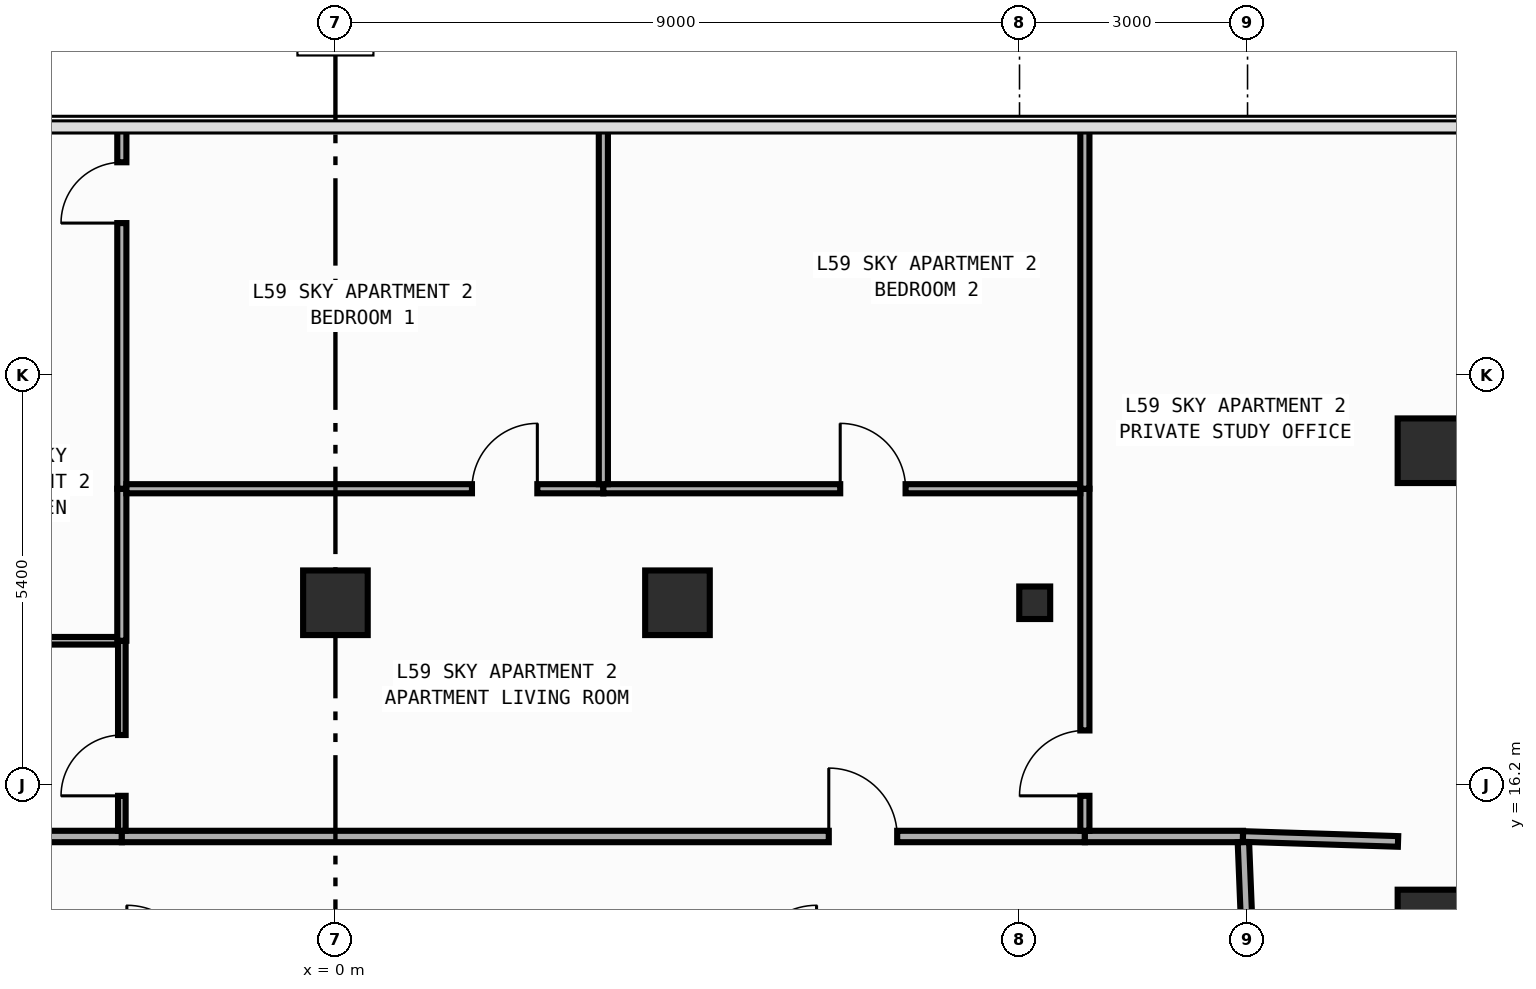
"""IFC4 building model, lengths in metres.
Left out: names, types, materials, properties, quantities, classifications, styles, units other than length and angle.
Written with IfcOpenShell. Run it as: python <this file> out.ifc"""

import sys

from ifc_helpers import new_model, si_unit, direction, frame, frame_2d, origin, origin_2d, place, context, subcontext, project, spatial, rectangle, i_section, extrude, element, fill, save


model = new_model("IFC4")
c1 = context("Model", 3, precision=1e-05, world=origin(), true_north=direction((0.0, 1.0)))
c2 = subcontext(c1, "Body", "Model", "MODEL_VIEW")
j1 = project(units=[si_unit("LENGTHUNIT", "METRE"), si_unit("PLANEANGLEUNIT", "RADIAN")], contexts=[c1])
p1 = place(None, origin())
s1 = spatial("IfcSite", under=j1, at=p1, CompositionType="ELEMENT")
p2 = place(p1, origin())
s2 = spatial("IfcBuilding", under=s1, at=p2, CompositionType="ELEMENT")
p3 = place(p2, frame((0.0, 0.0, 251.2)))
s3 = spatial("IfcBuildingStorey", under=s2, at=p3, CompositionType="ELEMENT", Elevation=251.2)
p4 = place(p3, frame((9.2, 18.6, 0.0), z_axis=(0.0, 0.0, 1.0), x_axis=(1.0, 0.0, 0.0)))
e1 = element("IfcColumn", 1, at=p4, inside=s3, PredefinedType="COLUMN", context=c2, shape_type="SweptSolid", body=[
    extrude(i_section(OverallWidth=0.407, OverallDepth=0.428, WebThickness=0.02, FlangeThickness=0.035, FilletRadius=0.022, at=origin_2d()), origin(), (0.0, 0.0, 1.0), 3.6),
])
for number, where, z_axis, x_axis in (
    (2, (14.4, 14.4, 0.0), (0.0, 0.0, 1.0), (1.0, 0.0, 0.0)),
    (3, (0.0, 18.6, 0.0), (0.0, 0.0, 1.0), (1.0, 0.0, 0.0)),
    (4, (4.5, 18.6, 0.0), (0.0, 0.0, 1.0), (1.0, 0.0, 0.0)),
    (5, (14.4, 20.6, 0.0), (0.0, 0.0, 1.0), (1.0, 0.0, 0.0)),
):
    element("IfcColumn", number, at=place(p3, frame(where, z_axis=z_axis, x_axis=x_axis)), inside=s3, PredefinedType="COLUMN", context=c2, shape_type="SweptSolid", body=[
        extrude(rectangle(XDim=0.85, YDim=0.85, at=origin_2d()), origin(), (0.0, 0.0, 1.0), 3.6),
    ])
p5 = place(p3, frame((-5.4, 15.525, 0.0), z_axis=(0.0, 0.0, 1.0), x_axis=(1.0, 0.0, 0.0)))
e6 = element("IfcWall", 6, at=p5, inside=s3, PredefinedType="PARTITIONING", context=c2, shape_type="SweptSolid", body=[
    extrude(rectangle(XDim=2.59, YDim=0.15, at=frame_2d((1.295, 0.0))), origin(), (0.0, 0.0, 1.0), 3.34),
])
p6 = place(p3, frame((-2.81, 15.525, 0.0), z_axis=(0.0, 0.0, 1.0), x_axis=(1.0, 0.0, 0.0)))
e7 = element("IfcWall", 7, at=p6, inside=s3, PredefinedType="PARTITIONING", context=c2, shape_type="SweptSolid", body=[
    extrude(rectangle(XDim=12.67, YDim=0.15, at=frame_2d((6.335, 0.0))), origin(), (0.0, 0.0, 1.0), 3.34),
])
p7 = place(p6, frame((9.301, 0.0, 0.0)))
e8 = element("IfcOpeningElement", 8, at=p7, cuts=e7, PredefinedType="OPENING", context=c2, shape_type="SweptSolid", body=[
    extrude(rectangle(XDim=0.9, YDim=2.15, at=frame_2d((0.45, 1.075))), frame((0.0, 0.085, 0.0), z_axis=(0.0, -1.0, 0.0), x_axis=(1.0, 0.0, 0.0)), (0.0, 0.0, 1.0), 0.17),
])
p8 = place(p3, frame((9.86, 15.525, 0.0), z_axis=(0.0, 0.0, 1.0), x_axis=(1.0, 0.0, 0.0)))
e9 = element("IfcWall", 9, at=p8, inside=s3, PredefinedType="PARTITIONING", context=c2, shape_type="SweptSolid", body=[
    extrude(rectangle(XDim=2.08, YDim=0.15, at=frame_2d((1.04, 0.0))), origin(), (0.0, 0.0, 1.0), 3.34),
])
p9 = place(p3, frame((12.015, 13.72, 0.0), z_axis=(0.0, 0.0, 1.0), x_axis=(-0.040046877756, 0.99919780203, 0.0)))
e10 = element("IfcWall", 10, at=p9, inside=s3, PredefinedType="PARTITIONING", context=c2, shape_type="SweptSolid", body=[
    extrude(rectangle(XDim=1.731, YDim=0.15, at=frame_2d((0.866, 0.0))), origin(), (0.0, 0.0, 1.0), 3.34),
])
p10 = place(p3, frame((-5.33, 18.1, 0.0), z_axis=(0.0, 0.0, 1.0), x_axis=(1.0, 0.0, 0.0)))
e11 = element("IfcWall", 11, at=p10, inside=s3, PredefinedType="PARTITIONING", context=c2, shape_type="SweptSolid", body=[
    extrude(rectangle(XDim=2.47, YDim=0.1, at=frame_2d((1.235, 0.0))), origin(), (0.0, 0.0, 1.0), 3.34),
])
p11 = place(p3, frame((-2.81, 15.6, 0.0), z_axis=(0.0, 0.0, 1.0), x_axis=(0.0, 1.0, 0.0)))
e12 = element("IfcWall", 12, at=p11, inside=s3, PredefinedType="PARTITIONING", context=c2, shape_type="SweptSolid", body=[
    extrude(rectangle(XDim=2.5, YDim=0.1, at=frame_2d((1.25, 0.0))), origin(), (0.0, 0.0, 1.0), 3.34),
])
p12 = place(p11, frame((0.46, 0.0, 0.0)))
e13 = element("IfcOpeningElement", 13, at=p12, cuts=e12, PredefinedType="OPENING", context=c2, shape_type="SweptSolid", body=[
    extrude(rectangle(XDim=0.8, YDim=2.1, at=frame_2d((0.4, 1.05))), frame((0.0, 0.06, 0.0), z_axis=(0.0, -1.0, 0.0), x_axis=(1.0, 0.0, 0.0)), (0.0, 0.0, 1.0), 0.12),
])
p13 = place(p3, frame((-2.81, 18.1, 0.0), z_axis=(0.0, 0.0, 1.0), x_axis=(0.0, 1.0, 0.0)))
e14 = element("IfcWall", 14, at=p13, inside=s3, PredefinedType="PARTITIONING", context=c2, shape_type="SweptSolid", body=[
    extrude(rectangle(XDim=2.0, YDim=0.12, at=frame_2d((1.0, 0.0))), origin(), (0.0, 0.0, 1.0), 3.34),
])
p14 = place(p3, frame((-2.81, 20.1, 0.0), z_axis=(0.0, 0.0, 1.0), x_axis=(0.0, 1.0, 0.0)))
e15 = element("IfcWall", 15, at=p14, inside=s3, PredefinedType="PARTITIONING", context=c2, shape_type="SweptSolid", body=[
    extrude(rectangle(XDim=4.755, YDim=0.12, at=frame_2d((2.377, 0.0))), origin(), (0.0, 0.0, 1.0), 3.34),
])
p15 = place(p14, frame((3.495, 0.0, 0.0)))
e16 = element("IfcOpeningElement", 16, at=p15, cuts=e15, PredefinedType="OPENING", context=c2, shape_type="SweptSolid", body=[
    extrude(rectangle(XDim=0.8, YDim=2.1, at=frame_2d((0.4, 1.05))), frame((0.0, 0.07, 0.0), z_axis=(0.0, -1.0, 0.0), x_axis=(1.0, 0.0, 0.0)), (0.0, 0.0, 1.0), 0.14),
])
p16 = place(p3, frame((9.86, 15.6, 0.0), z_axis=(0.0, 0.0, 1.0), x_axis=(0.0, 1.0, 0.0)))
e17 = element("IfcWall", 17, at=p16, inside=s3, PredefinedType="PARTITIONING", context=c2, shape_type="SweptSolid", body=[
    extrude(rectangle(XDim=4.5, YDim=0.12, at=frame_2d((2.25, 0.0))), origin(), (0.0, 0.0, 1.0), 3.34),
])
p17 = place(p16, frame((0.46, 0.0, 0.0)))
e18 = element("IfcOpeningElement", 18, at=p17, cuts=e17, PredefinedType="OPENING", context=c2, shape_type="SweptSolid", body=[
    extrude(rectangle(XDim=0.86, YDim=2.15, at=frame_2d((0.43, 1.075))), frame((0.0, 0.07, 0.0), z_axis=(0.0, -1.0, 0.0), x_axis=(1.0, 0.0, 0.0)), (0.0, 0.0, 1.0), 0.14),
])
p18 = place(p3, frame((-2.75, 20.1, 0.0), z_axis=(0.0, 0.0, 1.0), x_axis=(1.0, 0.0, 0.0)))
e19 = element("IfcWall", 19, at=p18, inside=s3, PredefinedType="PARTITIONING", context=c2, shape_type="SweptSolid", body=[
    extrude(rectangle(XDim=6.275, YDim=0.12, at=frame_2d((3.137, 0.0))), origin(), (0.0, 0.0, 1.0), 3.34),
])
p19 = place(p18, frame((4.546, 0.0, 0.0)))
e20 = element("IfcOpeningElement", 20, at=p19, cuts=e19, PredefinedType="OPENING", context=c2, shape_type="SweptSolid", body=[
    extrude(rectangle(XDim=0.86, YDim=2.15, at=frame_2d((0.43, 1.075))), frame((0.0, 0.07, 0.0), z_axis=(0.0, -1.0, 0.0), x_axis=(1.0, 0.0, 0.0)), (0.0, 0.0, 1.0), 0.14),
])
p20 = place(p3, frame((3.525, 20.1, 0.0), z_axis=(0.0, 0.0, 1.0), x_axis=(1.0, 0.0, 0.0)))
e21 = element("IfcWall", 21, at=p20, inside=s3, PredefinedType="PARTITIONING", context=c2, shape_type="SweptSolid", body=[
    extrude(rectangle(XDim=6.275, YDim=0.12, at=frame_2d((3.138, 0.0))), origin(), (0.0, 0.0, 1.0), 3.34),
])
p21 = place(p20, frame((3.116, 0.0, 0.0)))
e22 = element("IfcOpeningElement", 22, at=p21, cuts=e21, PredefinedType="OPENING", context=c2, shape_type="SweptSolid", body=[
    extrude(rectangle(XDim=0.86, YDim=2.15, at=frame_2d((0.43, 1.075))), frame((0.0, 0.07, 0.0), z_axis=(0.0, -1.0, 0.0), x_axis=(1.0, 0.0, 0.0)), (0.0, 0.0, 1.0), 0.14),
])
p22 = place(p3, frame((9.86, 20.1, 0.0), z_axis=(0.0, 0.0, 1.0), x_axis=(0.0, 1.0, 0.0)))
e23 = element("IfcWall", 23, at=p22, inside=s3, PredefinedType="PARTITIONING", context=c2, shape_type="SweptSolid", body=[
    extrude(rectangle(XDim=4.755, YDim=0.12, at=frame_2d((2.377, 0.0))), origin(), (0.0, 0.0, 1.0), 3.34),
])
p23 = place(p3, frame((11.94, 15.525, 0.0), z_axis=(0.0, 0.0, 1.0), x_axis=(0.999493701671, -0.031817295912, 0.0)))
e24 = element("IfcWall", 24, at=p23, inside=s3, PredefinedType="PARTITIONING", context=c2, shape_type="SweptSolid", body=[
    extrude(rectangle(XDim=2.041, YDim=0.14, at=frame_2d((1.021, 0.0))), origin(), (0.0, 0.0, 1.0), 3.34),
])
p24 = place(p3, frame((3.525, 20.16, 0.0), z_axis=(0.0, 0.0, 1.0), x_axis=(0.0, 1.0, 0.0)))
e25 = element("IfcWall", 25, at=p24, inside=s3, PredefinedType="PARTITIONING", context=c2, shape_type="SweptSolid", body=[
    extrude(rectangle(XDim=4.695, YDim=0.12, at=frame_2d((2.348, 0.0))), origin(), (0.0, 0.0, 1.0), 3.34),
])
p25 = place(p7, origin())
e26 = element("IfcDoor", 26, at=p25, inside=s3, OperationType="SINGLE_SWING_LEFT", PredefinedType="DOOR", context=c2, shape_type="SweptSolid", body=[
    extrude(rectangle(XDim=0.9, YDim=2.15, at=frame_2d((0.45, 1.075))), frame((0.0, 0.025, 0.0), z_axis=(0.0, -1.0, 0.0), x_axis=(1.0, 0.0, 0.0)), (0.0, 0.0, 1.0), 0.05),
])
fill(e8, e26)
p26 = place(p12, origin())
e27 = element("IfcDoor", 27, at=p26, inside=s3, OperationType="SINGLE_SWING_LEFT", PredefinedType="DOOR", context=c2, shape_type="SweptSolid", body=[
    extrude(rectangle(XDim=0.8, YDim=2.1, at=frame_2d((0.4, 1.05))), frame((0.0, 0.025, 0.0), z_axis=(0.0, -1.0, 0.0), x_axis=(1.0, 0.0, 0.0)), (0.0, 0.0, 1.0), 0.05),
])
fill(e13, e27)
p27 = place(p17, origin())
e28 = element("IfcDoor", 28, at=p27, inside=s3, OperationType="SINGLE_SWING_LEFT", PredefinedType="DOOR", context=c2, shape_type="SweptSolid", body=[
    extrude(rectangle(XDim=0.86, YDim=2.15, at=frame_2d((0.43, 1.075))), frame((0.0, 0.025, 0.0), z_axis=(0.0, -1.0, 0.0), x_axis=(1.0, 0.0, 0.0)), (0.0, 0.0, 1.0), 0.05),
])
fill(e18, e28)
p28 = place(p19, origin())
e29 = element("IfcDoor", 29, at=p28, inside=s3, OperationType="SINGLE_SWING_RIGHT", PredefinedType="DOOR", context=c2, shape_type="SweptSolid", body=[
    extrude(rectangle(XDim=0.86, YDim=2.15, at=frame_2d((0.43, 1.075))), frame((0.0, 0.025, 0.0), z_axis=(0.0, -1.0, 0.0), x_axis=(1.0, 0.0, 0.0)), (0.0, 0.0, 1.0), 0.05),
])
fill(e20, e29)
p29 = place(p21, origin())
e30 = element("IfcDoor", 30, at=p29, inside=s3, OperationType="SINGLE_SWING_LEFT", PredefinedType="DOOR", context=c2, shape_type="SweptSolid", body=[
    extrude(rectangle(XDim=0.86, YDim=2.15, at=frame_2d((0.43, 1.075))), frame((0.0, 0.025, 0.0), z_axis=(0.0, -1.0, 0.0), x_axis=(1.0, 0.0, 0.0)), (0.0, 0.0, 1.0), 0.05),
])
fill(e22, e30)
p30 = place(p15, origin())
e31 = element("IfcDoor", 31, at=p30, inside=s3, OperationType="SINGLE_SWING_LEFT", PredefinedType="DOOR", context=c2, shape_type="SweptSolid", body=[
    extrude(rectangle(XDim=0.8, YDim=2.1, at=frame_2d((0.4, 1.05))), frame((0.0, 0.025, 0.0), z_axis=(0.0, -1.0, 0.0), x_axis=(1.0, 0.0, 0.0)), (0.0, 0.0, 1.0), 0.05),
])
fill(e16, e31)
save(model, sys.argv[1])
